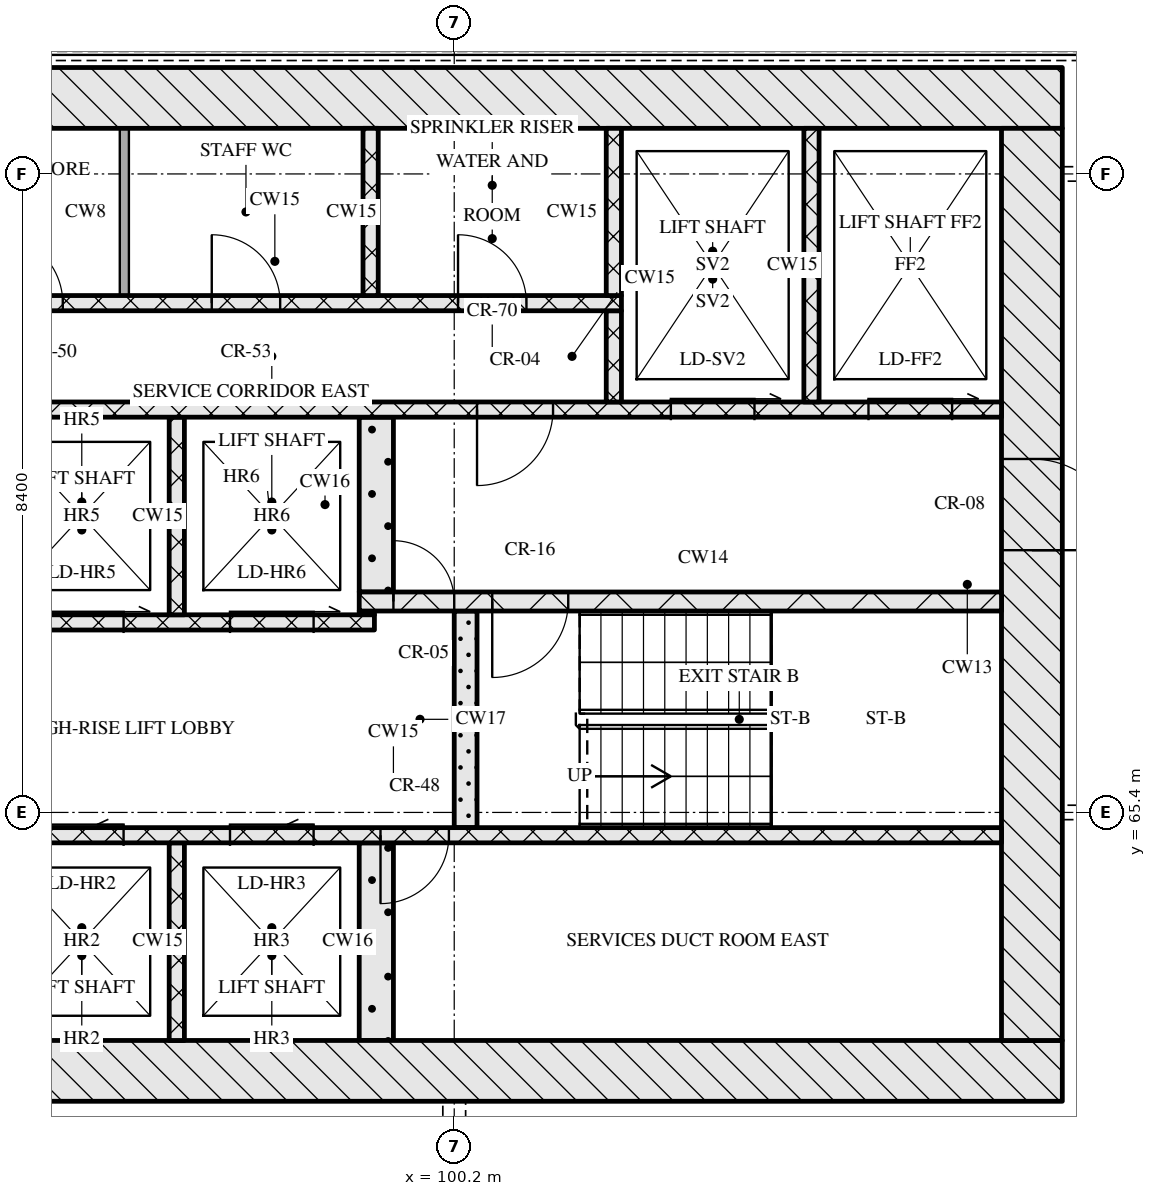
"""IFC4 building model, lengths in metres.
Left out: names, types, materials, properties, quantities, classifications, styles, units other than length and angle.
Written with IfcOpenShell. Run it as: python <this file> out.ifc"""

import sys

from ifc_helpers import new_model, si_unit, direction, frame, frame_2d, origin, place, context, subcontext, project, spatial, rectangle, extrude, element, fill, save


model = new_model("IFC4")
c1 = context("Model", 3, precision=1e-05, world=origin(), true_north=direction((0.0, 1.0)))
c2 = subcontext(c1, "Body", "Model", "MODEL_VIEW")
j1 = project(units=[si_unit("LENGTHUNIT", "METRE"), si_unit("PLANEANGLEUNIT", "RADIAN")], contexts=[c1])
p1 = place(None, origin())
s1 = spatial("IfcSite", under=j1, at=p1, CompositionType="ELEMENT")
p2 = place(p1, origin())
s2 = spatial("IfcBuilding", under=s1, at=p2, CompositionType="ELEMENT")
p3 = place(p2, frame((0.0, 0.0, 151.05)))
s3 = spatial("IfcBuildingStorey", under=s2, at=p3, CompositionType="ELEMENT", Elevation=151.05)
p4 = place(p3, frame((67.0, 62.0, 0.0), z_axis=(0.0, 0.0, 1.0), x_axis=(1.0, 0.0, 0.0)))
e1 = element("IfcWall", 1, at=p4, inside=s3, PredefinedType="SOLIDWALL", context=c2, shape_type="SweptSolid", body=[
    extrude(rectangle(XDim=41.2, YDim=0.8, at=frame_2d((20.6, 0.0))), origin(), (0.0, 0.0, 1.0), 3.32),
])
p5 = place(p4, frame((20.95, 0.0, 0.0)))
e2 = element("IfcOpeningElement", 2, at=p5, cuts=e1, PredefinedType="OPENING", context=c2, shape_type="SweptSolid", body=[
    extrude(rectangle(XDim=1.8, YDim=2.1, at=frame_2d((0.9, 1.05))), frame((0.0, 0.41, 0.0), z_axis=(0.0, -1.0, 0.0), x_axis=(1.0, 0.0, 0.0)), (0.0, 0.0, 1.0), 0.82),
])
p6 = place(p3, frame((67.0, 74.8, 0.0), z_axis=(0.0, 0.0, 1.0), x_axis=(1.0, 0.0, 0.0)))
e3 = element("IfcWall", 3, at=p6, inside=s3, PredefinedType="SOLIDWALL", context=c2, shape_type="SweptSolid", body=[
    extrude(rectangle(XDim=41.2, YDim=0.8, at=frame_2d((20.6, 0.0))), origin(), (0.0, 0.0, 1.0), 3.32),
])
p7 = place(p3, frame((107.8, 62.4, 0.0), z_axis=(0.0, 0.0, 1.0), x_axis=(0.0, 1.0, 0.0)))
e4 = element("IfcWall", 4, at=p7, inside=s3, PredefinedType="SOLIDWALL", context=c2, shape_type="SweptSolid", body=[
    extrude(rectangle(XDim=12.0, YDim=0.8, at=frame_2d((6.0, 0.0))), origin(), (0.0, 0.0, 1.0), 3.32),
])
p8 = place(p7, frame((6.45, 0.0, 0.0)))
e5 = element("IfcOpeningElement", 5, at=p8, cuts=e4, PredefinedType="OPENING", context=c2, shape_type="SweptSolid", body=[
    extrude(rectangle(XDim=1.2, YDim=2.1, at=frame_2d((0.6, 1.05))), frame((0.0, 0.41, 0.0), z_axis=(0.0, -1.0, 0.0), x_axis=(1.0, 0.0, 0.0)), (0.0, 0.0, 1.0), 0.82),
])
p9 = place(p3, frame((96.55, 62.4, 0.0), z_axis=(0.0, 0.0, 1.0), x_axis=(0.0, 1.0, 0.0)))
e6 = element("IfcWall", 6, at=p9, inside=s3, PredefinedType="SOLIDWALL", context=c2, shape_type="SweptSolid", body=[
    extrude(rectangle(XDim=2.6, YDim=0.2, at=frame_2d((1.3, 0.0))), origin(), (0.0, 0.0, 1.0), 3.32),
])
p10 = place(p3, frame((99.175, 62.4, 0.0), z_axis=(0.0, 0.0, 1.0), x_axis=(0.0, 1.0, 0.0)))
e7 = element("IfcWall", 7, at=p10, inside=s3, PredefinedType="SOLIDWALL", context=c2, shape_type="SweptSolid", body=[
    extrude(rectangle(XDim=2.6, YDim=0.45, at=frame_2d((1.3, 0.0))), origin(), (0.0, 0.0, 1.0), 3.32),
])
p11 = place(p3, frame((91.4, 65.1, 0.0), z_axis=(0.0, 0.0, 1.0), x_axis=(1.0, 0.0, 0.0)))
e8 = element("IfcWall", 8, at=p11, inside=s3, PredefinedType="SOLIDWALL", context=c2, shape_type="SweptSolid", body=[
    extrude(rectangle(XDim=16.0, YDim=0.2, at=frame_2d((8.0, 0.0))), origin(), (0.0, 0.0, 1.0), 3.32),
])
p12 = place(p11, frame((0.85, 0.0, 0.0)))
e9 = element("IfcOpeningElement", 9, at=p12, cuts=e8, PredefinedType="OPENING", context=c2, shape_type="SweptSolid", body=[
    extrude(rectangle(XDim=1.1, YDim=2.1, at=frame_2d((0.55, 1.05))), frame((0.0, 0.11, 0.0), z_axis=(0.0, -1.0, 0.0), x_axis=(1.0, 0.0, 0.0)), (0.0, 0.0, 1.0), 0.22),
])
p13 = place(p11, frame((3.35, 0.0, 0.0)))
e10 = element("IfcOpeningElement", 10, at=p13, cuts=e8, PredefinedType="OPENING", context=c2, shape_type="SweptSolid", body=[
    extrude(rectangle(XDim=1.1, YDim=2.1, at=frame_2d((0.55, 1.05))), frame((0.0, 0.11, 0.0), z_axis=(0.0, -1.0, 0.0), x_axis=(1.0, 0.0, 0.0)), (0.0, 0.0, 1.0), 0.22),
])
p14 = place(p11, frame((5.85, 0.0, 0.0)))
e11 = element("IfcOpeningElement", 11, at=p14, cuts=e8, PredefinedType="OPENING", context=c2, shape_type="SweptSolid", body=[
    extrude(rectangle(XDim=1.1, YDim=2.1, at=frame_2d((0.55, 1.05))), frame((0.0, 0.11, 0.0), z_axis=(0.0, -1.0, 0.0), x_axis=(1.0, 0.0, 0.0)), (0.0, 0.0, 1.0), 0.22),
])
p15 = place(p11, frame((7.83, 0.0, 0.0)))
e12 = element("IfcOpeningElement", 12, at=p15, cuts=e8, PredefinedType="OPENING", context=c2, shape_type="SweptSolid", body=[
    extrude(rectangle(XDim=0.9, YDim=2.1, at=frame_2d((0.45, 1.05))), frame((0.0, 0.11, 0.0), z_axis=(0.0, -1.0, 0.0), x_axis=(1.0, 0.0, 0.0)), (0.0, 0.0, 1.0), 0.22),
])
p16 = place(p3, frame((100.35, 65.2, 0.0), z_axis=(0.0, 0.0, 1.0), x_axis=(0.0, 1.0, 0.0)))
e13 = element("IfcWall", 13, at=p16, inside=s3, PredefinedType="SOLIDWALL", context=c2, shape_type="SweptSolid", body=[
    extrude(rectangle(XDim=2.85, YDim=0.3, at=frame_2d((1.425, 0.0))), origin(), (0.0, 0.0, 1.0), 3.32),
])
p17 = place(p3, frame((76.05, 67.9, 0.0), z_axis=(0.0, 0.0, 1.0), x_axis=(1.0, 0.0, 0.0)))
e14 = element("IfcWall", 14, at=p17, inside=s3, PredefinedType="SOLIDWALL", context=c2, shape_type="SweptSolid", body=[
    extrude(rectangle(XDim=23.1, YDim=0.2, at=frame_2d((11.55, 0.0))), origin(), (0.0, 0.0, 1.0), 3.32),
])
p18 = place(p17, frame((1.4, 0.0, 0.0)))
e15 = element("IfcOpeningElement", 15, at=p18, cuts=e14, PredefinedType="OPENING", context=c2, shape_type="SweptSolid", body=[
    extrude(rectangle(XDim=0.9, YDim=2.1, at=frame_2d((0.45, 1.05))), frame((0.0, 0.11, 0.0), z_axis=(0.0, -1.0, 0.0), x_axis=(1.0, 0.0, 0.0)), (0.0, 0.0, 1.0), 0.22),
])
p19 = place(p17, frame((5.11, 0.0, 0.0)))
e16 = element("IfcOpeningElement", 16, at=p19, cuts=e14, PredefinedType="OPENING", context=c2, shape_type="SweptSolid", body=[
    extrude(rectangle(XDim=0.9, YDim=2.1, at=frame_2d((0.45, 1.05))), frame((0.0, 0.11, 0.0), z_axis=(0.0, -1.0, 0.0), x_axis=(1.0, 0.0, 0.0)), (0.0, 0.0, 1.0), 0.22),
])
p20 = place(p17, frame((8.45, 0.0, 0.0)))
e17 = element("IfcOpeningElement", 17, at=p20, cuts=e14, PredefinedType="OPENING", context=c2, shape_type="SweptSolid", body=[
    extrude(rectangle(XDim=0.9, YDim=2.1, at=frame_2d((0.45, 1.05))), frame((0.0, 0.11, 0.0), z_axis=(0.0, -1.0, 0.0), x_axis=(1.0, 0.0, 0.0)), (0.0, 0.0, 1.0), 0.22),
])
p21 = place(p17, frame((10.91, 0.0, 0.0)))
e18 = element("IfcOpeningElement", 18, at=p21, cuts=e14, PredefinedType="OPENING", context=c2, shape_type="SweptSolid", body=[
    extrude(rectangle(XDim=0.9, YDim=2.1, at=frame_2d((0.45, 1.05))), frame((0.0, 0.11, 0.0), z_axis=(0.0, -1.0, 0.0), x_axis=(1.0, 0.0, 0.0)), (0.0, 0.0, 1.0), 0.22),
])
p22 = place(p17, frame((13.55, 0.0, 0.0)))
e19 = element("IfcOpeningElement", 19, at=p22, cuts=e14, PredefinedType="OPENING", context=c2, shape_type="SweptSolid", body=[
    extrude(rectangle(XDim=1.0, YDim=2.1, at=frame_2d((0.5, 1.05))), frame((0.0, 0.11, 0.0), z_axis=(0.0, -1.0, 0.0), x_axis=(1.0, 0.0, 0.0)), (0.0, 0.0, 1.0), 0.22),
])
p23 = place(p17, frame((16.2, 0.0, 0.0)))
e20 = element("IfcOpeningElement", 20, at=p23, cuts=e14, PredefinedType="OPENING", context=c2, shape_type="SweptSolid", body=[
    extrude(rectangle(XDim=1.1, YDim=2.1, at=frame_2d((0.55, 1.05))), frame((0.0, 0.11, 0.0), z_axis=(0.0, -1.0, 0.0), x_axis=(1.0, 0.0, 0.0)), (0.0, 0.0, 1.0), 0.22),
])
p24 = place(p17, frame((18.7, 0.0, 0.0)))
e21 = element("IfcOpeningElement", 21, at=p24, cuts=e14, PredefinedType="OPENING", context=c2, shape_type="SweptSolid", body=[
    extrude(rectangle(XDim=1.1, YDim=2.1, at=frame_2d((0.55, 1.05))), frame((0.0, 0.11, 0.0), z_axis=(0.0, -1.0, 0.0), x_axis=(1.0, 0.0, 0.0)), (0.0, 0.0, 1.0), 0.22),
])
p25 = place(p17, frame((21.2, 0.0, 0.0)))
e22 = element("IfcOpeningElement", 22, at=p25, cuts=e14, PredefinedType="OPENING", context=c2, shape_type="SweptSolid", body=[
    extrude(rectangle(XDim=1.1, YDim=2.1, at=frame_2d((0.55, 1.05))), frame((0.0, 0.11, 0.0), z_axis=(0.0, -1.0, 0.0), x_axis=(1.0, 0.0, 0.0)), (0.0, 0.0, 1.0), 0.22),
])
p26 = place(p3, frame((96.55, 68.0, 0.0), z_axis=(0.0, 0.0, 1.0), x_axis=(0.0, 1.0, 0.0)))
e23 = element("IfcWall", 23, at=p26, inside=s3, PredefinedType="SOLIDWALL", context=c2, shape_type="SweptSolid", body=[
    extrude(rectangle(XDim=2.6, YDim=0.2, at=frame_2d((1.3, 0.0))), origin(), (0.0, 0.0, 1.0), 3.32),
])
p27 = place(p3, frame((98.95, 68.025, 0.0), z_axis=(0.0, 0.0, 1.0), x_axis=(1.0, 0.0, 0.0)))
e24 = element("IfcWall", 24, at=p27, inside=s3, PredefinedType="SOLIDWALL", context=c2, shape_type="SweptSolid", body=[
    extrude(rectangle(XDim=0.2, YDim=0.05, at=frame_2d((0.1, 0.0))), origin(), (0.0, 0.0, 1.0), 3.32),
])
p28 = place(p3, frame((98.95, 68.175, 0.0), z_axis=(0.0, 0.0, 1.0), x_axis=(1.0, 0.0, 0.0)))
e25 = element("IfcWall", 25, at=p28, inside=s3, PredefinedType="SOLIDWALL", context=c2, shape_type="SweptSolid", body=[
    extrude(rectangle(XDim=8.45, YDim=0.25, at=frame_2d((4.225, 0.0))), origin(), (0.0, 0.0, 1.0), 3.32),
])
p29 = place(p28, frame((0.45, 0.0, 0.0)))
e26 = element("IfcOpeningElement", 26, at=p29, cuts=e25, PredefinedType="OPENING", context=c2, shape_type="SweptSolid", body=[
    extrude(rectangle(XDim=0.8, YDim=2.1, at=frame_2d((0.4, 1.05))), frame((0.0, 0.135, 0.0), z_axis=(0.0, -1.0, 0.0), x_axis=(1.0, 0.0, 0.0)), (0.0, 0.0, 1.0), 0.27),
])
p30 = place(p28, frame((1.75, 0.0, 0.0)))
e27 = element("IfcOpeningElement", 27, at=p30, cuts=e25, PredefinedType="OPENING", context=c2, shape_type="SweptSolid", body=[
    extrude(rectangle(XDim=1.0, YDim=2.1, at=frame_2d((0.5, 1.05))), frame((0.0, 0.135, 0.0), z_axis=(0.0, -1.0, 0.0), x_axis=(1.0, 0.0, 0.0)), (0.0, 0.0, 1.0), 0.27),
])
p31 = place(p3, frame((99.175, 68.3, 0.0), z_axis=(0.0, 0.0, 1.0), x_axis=(0.0, 1.0, 0.0)))
e28 = element("IfcWall", 28, at=p31, inside=s3, PredefinedType="SOLIDWALL", context=c2, shape_type="SweptSolid", body=[
    extrude(rectangle(XDim=2.3, YDim=0.45, at=frame_2d((1.15, 0.0))), origin(), (0.0, 0.0, 1.0), 3.32),
])
p32 = place(p3, frame((67.8, 70.7, 0.0), z_axis=(0.0, 0.0, 1.0), x_axis=(1.0, 0.0, 0.0)))
e29 = element("IfcWall", 29, at=p32, inside=s3, PredefinedType="SOLIDWALL", context=c2, shape_type="SweptSolid", body=[
    extrude(rectangle(XDim=39.6, YDim=0.2, at=frame_2d((19.8, 0.0))), origin(), (0.0, 0.0, 1.0), 3.32),
])
p33 = place(p32, frame((0.65, 0.0, 0.0)))
e30 = element("IfcOpeningElement", 30, at=p33, cuts=e29, PredefinedType="OPENING", context=c2, shape_type="SweptSolid", body=[
    extrude(rectangle(XDim=1.1, YDim=2.1, at=frame_2d((0.55, 1.05))), frame((0.0, 0.11, 0.0), z_axis=(0.0, -1.0, 0.0), x_axis=(1.0, 0.0, 0.0)), (0.0, 0.0, 1.0), 0.22),
])
p34 = place(p32, frame((3.25, 0.0, 0.0)))
e31 = element("IfcOpeningElement", 31, at=p34, cuts=e29, PredefinedType="OPENING", context=c2, shape_type="SweptSolid", body=[
    extrude(rectangle(XDim=1.1, YDim=2.1, at=frame_2d((0.55, 1.05))), frame((0.0, 0.11, 0.0), z_axis=(0.0, -1.0, 0.0), x_axis=(1.0, 0.0, 0.0)), (0.0, 0.0, 1.0), 0.22),
])
p35 = place(p32, frame((5.9, 0.0, 0.0)))
e32 = element("IfcOpeningElement", 32, at=p35, cuts=e29, PredefinedType="OPENING", context=c2, shape_type="SweptSolid", body=[
    extrude(rectangle(XDim=1.0, YDim=2.1, at=frame_2d((0.5, 1.05))), frame((0.0, 0.11, 0.0), z_axis=(0.0, -1.0, 0.0), x_axis=(1.0, 0.0, 0.0)), (0.0, 0.0, 1.0), 0.22),
])
p36 = place(p32, frame((21.7, 0.0, 0.0)))
e33 = element("IfcOpeningElement", 33, at=p36, cuts=e29, PredefinedType="OPENING", context=c2, shape_type="SweptSolid", body=[
    extrude(rectangle(XDim=1.0, YDim=2.1, at=frame_2d((0.5, 1.05))), frame((0.0, 0.11, 0.0), z_axis=(0.0, -1.0, 0.0), x_axis=(1.0, 0.0, 0.0)), (0.0, 0.0, 1.0), 0.22),
])
p37 = place(p32, frame((32.7, 0.0, 0.0)))
e34 = element("IfcOpeningElement", 34, at=p37, cuts=e29, PredefinedType="OPENING", context=c2, shape_type="SweptSolid", body=[
    extrude(rectangle(XDim=1.0, YDim=2.1, at=frame_2d((0.5, 1.05))), frame((0.0, 0.11, 0.0), z_axis=(0.0, -1.0, 0.0), x_axis=(1.0, 0.0, 0.0)), (0.0, 0.0, 1.0), 0.22),
])
p38 = place(p32, frame((35.25, 0.0, 0.0)))
e35 = element("IfcOpeningElement", 35, at=p38, cuts=e29, PredefinedType="OPENING", context=c2, shape_type="SweptSolid", body=[
    extrude(rectangle(XDim=1.1, YDim=2.1, at=frame_2d((0.55, 1.05))), frame((0.0, 0.11, 0.0), z_axis=(0.0, -1.0, 0.0), x_axis=(1.0, 0.0, 0.0)), (0.0, 0.0, 1.0), 0.22),
])
p39 = place(p32, frame((37.85, 0.0, 0.0)))
e36 = element("IfcOpeningElement", 36, at=p39, cuts=e29, PredefinedType="OPENING", context=c2, shape_type="SweptSolid", body=[
    extrude(rectangle(XDim=1.1, YDim=2.1, at=frame_2d((0.55, 1.05))), frame((0.0, 0.11, 0.0), z_axis=(0.0, -1.0, 0.0), x_axis=(1.0, 0.0, 0.0)), (0.0, 0.0, 1.0), 0.22),
])
p40 = place(p3, frame((102.3, 70.8, 0.0), z_axis=(0.0, 0.0, 1.0), x_axis=(0.0, 1.0, 0.0)))
e37 = element("IfcWall", 37, at=p40, inside=s3, PredefinedType="SOLIDWALL", context=c2, shape_type="SweptSolid", body=[
    extrude(rectangle(XDim=1.2, YDim=0.2, at=frame_2d((0.6, 0.0))), origin(), (0.0, 0.0, 1.0), 3.32),
])
p41 = place(p3, frame((104.9, 70.8, 0.0), z_axis=(0.0, 0.0, 1.0), x_axis=(0.0, 1.0, 0.0)))
e38 = element("IfcWall", 38, at=p41, inside=s3, PredefinedType="SOLIDWALL", context=c2, shape_type="SweptSolid", body=[
    extrude(rectangle(XDim=3.6, YDim=0.2, at=frame_2d((1.8, 0.0))), origin(), (0.0, 0.0, 1.0), 3.32),
])
p42 = place(p3, frame((93.28, 72.1, 0.0), z_axis=(0.0, 0.0, 1.0), x_axis=(1.0, 0.0, 0.0)))
e39 = element("IfcWall", 39, at=p42, inside=s3, PredefinedType="SOLIDWALL", context=c2, shape_type="SweptSolid", body=[
    extrude(rectangle(XDim=9.12, YDim=0.2, at=frame_2d((4.56, 0.0))), origin(), (0.0, 0.0, 1.0), 3.32),
])
p43 = place(p42, frame((0.87, 0.0, 0.0)))
e40 = element("IfcOpeningElement", 40, at=p43, cuts=e39, PredefinedType="OPENING", context=c2, shape_type="SweptSolid", body=[
    extrude(rectangle(XDim=0.9, YDim=2.1, at=frame_2d((0.45, 1.05))), frame((0.0, 0.11, 0.0), z_axis=(0.0, -1.0, 0.0), x_axis=(1.0, 0.0, 0.0)), (0.0, 0.0, 1.0), 0.22),
])
p44 = place(p42, frame((3.73, 0.0, 0.0)))
e41 = element("IfcOpeningElement", 41, at=p44, cuts=e39, PredefinedType="OPENING", context=c2, shape_type="SweptSolid", body=[
    extrude(rectangle(XDim=0.9, YDim=2.1, at=frame_2d((0.45, 1.05))), frame((0.0, 0.11, 0.0), z_axis=(0.0, -1.0, 0.0), x_axis=(1.0, 0.0, 0.0)), (0.0, 0.0, 1.0), 0.22),
])
p45 = place(p42, frame((6.97, 0.0, 0.0)))
e42 = element("IfcOpeningElement", 42, at=p45, cuts=e39, PredefinedType="OPENING", context=c2, shape_type="SweptSolid", body=[
    extrude(rectangle(XDim=0.9, YDim=2.1, at=frame_2d((0.45, 1.05))), frame((0.0, 0.11, 0.0), z_axis=(0.0, -1.0, 0.0), x_axis=(1.0, 0.0, 0.0)), (0.0, 0.0, 1.0), 0.22),
])
p46 = place(p3, frame((95.86, 72.2, 0.0), z_axis=(0.0, 0.0, 1.0), x_axis=(0.0, 1.0, 0.0)))
e43 = element("IfcWall", 43, at=p46, inside=s3, PredefinedType="PARTITIONING", context=c2, shape_type="SweptSolid", body=[
    extrude(rectangle(XDim=2.2, YDim=0.12, at=frame_2d((1.1, 0.0))), origin(), (0.0, 0.0, 1.0), 3.32),
])
for number, where, z_axis, x_axis in (
    (44, (99.1, 72.2, 0.0), (0.0, 0.0, 1.0), (0.0, 1.0, 0.0)),
    (45, (102.3, 72.2, 0.0), (0.0, 0.0, 1.0), (0.0, 1.0, 0.0)),
):
    element("IfcWall", number, at=place(p3, frame(where, z_axis=z_axis, x_axis=x_axis)), inside=s3, PredefinedType="SOLIDWALL", context=c2, shape_type="SweptSolid", body=[
        extrude(rectangle(XDim=2.2, YDim=0.2, at=frame_2d((1.1, 0.0))), origin(), (0.0, 0.0, 1.0), 3.32),
    ])
p47 = place(p13, origin())
e46 = element("IfcDoor", 46, at=p47, inside=s3, OperationType="SLIDING_TO_LEFT", PredefinedType="DOOR", context=c2, shape_type="SweptSolid", body=[
    extrude(rectangle(XDim=1.1, YDim=2.1, at=frame_2d((0.55, 1.05))), frame((0.0, 0.025, 0.0), z_axis=(0.0, -1.0, 0.0), x_axis=(1.0, 0.0, 0.0)), (0.0, 0.0, 1.0), 0.05),
])
fill(e10, e46)
p48 = place(p14, origin())
e47 = element("IfcDoor", 47, at=p48, inside=s3, OperationType="SLIDING_TO_LEFT", PredefinedType="DOOR", context=c2, shape_type="SweptSolid", body=[
    extrude(rectangle(XDim=1.1, YDim=2.1, at=frame_2d((0.55, 1.05))), frame((0.0, 0.025, 0.0), z_axis=(0.0, -1.0, 0.0), x_axis=(1.0, 0.0, 0.0)), (0.0, 0.0, 1.0), 0.05),
])
fill(e11, e47)
p49 = place(p15, origin())
e48 = element("IfcDoor", 48, at=p49, inside=s3, OperationType="SINGLE_SWING_RIGHT", PredefinedType="DOOR", context=c2, shape_type="SweptSolid", body=[
    extrude(rectangle(XDim=0.9, YDim=2.1, at=frame_2d((0.45, 1.05))), frame((0.0, 0.025, 0.0), z_axis=(0.0, -1.0, 0.0), x_axis=(1.0, 0.0, 0.0)), (0.0, 0.0, 1.0), 0.05),
])
fill(e12, e48)
p50 = place(p24, origin())
e49 = element("IfcDoor", 49, at=p50, inside=s3, OperationType="SLIDING_TO_RIGHT", PredefinedType="DOOR", context=c2, shape_type="SweptSolid", body=[
    extrude(rectangle(XDim=1.1, YDim=2.1, at=frame_2d((0.55, 1.05))), frame((0.0, 0.025, 0.0), z_axis=(0.0, -1.0, 0.0), x_axis=(1.0, 0.0, 0.0)), (0.0, 0.0, 1.0), 0.05),
])
fill(e21, e49)
p51 = place(p25, origin())
e50 = element("IfcDoor", 50, at=p51, inside=s3, OperationType="SLIDING_TO_RIGHT", PredefinedType="DOOR", context=c2, shape_type="SweptSolid", body=[
    extrude(rectangle(XDim=1.1, YDim=2.1, at=frame_2d((0.55, 1.05))), frame((0.0, 0.025, 0.0), z_axis=(0.0, -1.0, 0.0), x_axis=(1.0, 0.0, 0.0)), (0.0, 0.0, 1.0), 0.05),
])
fill(e22, e50)
p52 = place(p29, origin())
e51 = element("IfcDoor", 51, at=p52, inside=s3, OperationType="SINGLE_SWING_LEFT", PredefinedType="DOOR", context=c2, shape_type="SweptSolid", body=[
    extrude(rectangle(XDim=0.8, YDim=2.1, at=frame_2d((0.4, 1.05))), frame((0.0, 0.025, 0.0), z_axis=(0.0, -1.0, 0.0), x_axis=(1.0, 0.0, 0.0)), (0.0, 0.0, 1.0), 0.05),
])
fill(e26, e51)
p53 = place(p30, origin())
e52 = element("IfcDoor", 52, at=p53, inside=s3, OperationType="SINGLE_SWING_RIGHT", PredefinedType="DOOR", context=c2, shape_type="SweptSolid", body=[
    extrude(rectangle(XDim=1.0, YDim=2.1, at=frame_2d((0.5, 1.05))), frame((0.0, 0.025, 0.0), z_axis=(0.0, -1.0, 0.0), x_axis=(1.0, 0.0, 0.0)), (0.0, 0.0, 1.0), 0.05),
])
fill(e27, e52)
p54 = place(p8, origin())
e53 = element("IfcDoor", 53, at=p54, inside=s3, OperationType="SINGLE_SWING_RIGHT", PredefinedType="DOOR", context=c2, shape_type="SweptSolid", body=[
    extrude(rectangle(XDim=1.2, YDim=2.1, at=frame_2d((0.6, 1.05))), frame((0.0, 0.025, 0.0), z_axis=(0.0, -1.0, 0.0), x_axis=(1.0, 0.0, 0.0)), (0.0, 0.0, 1.0), 0.05),
])
fill(e5, e53)
p55 = place(p37, origin())
e54 = element("IfcDoor", 54, at=p55, inside=s3, OperationType="SINGLE_SWING_RIGHT", PredefinedType="DOOR", context=c2, shape_type="SweptSolid", body=[
    extrude(rectangle(XDim=1.0, YDim=2.1, at=frame_2d((0.5, 1.05))), frame((0.0, 0.025, 0.0), z_axis=(0.0, -1.0, 0.0), x_axis=(1.0, 0.0, 0.0)), (0.0, 0.0, 1.0), 0.05),
])
fill(e34, e54)
p56 = place(p38, origin())
e55 = element("IfcDoor", 55, at=p56, inside=s3, OperationType="SLIDING_TO_RIGHT", PredefinedType="DOOR", context=c2, shape_type="SweptSolid", body=[
    extrude(rectangle(XDim=1.1, YDim=2.1, at=frame_2d((0.55, 1.05))), frame((0.0, 0.025, 0.0), z_axis=(0.0, -1.0, 0.0), x_axis=(1.0, 0.0, 0.0)), (0.0, 0.0, 1.0), 0.05),
])
fill(e35, e55)
p57 = place(p39, origin())
e56 = element("IfcDoor", 56, at=p57, inside=s3, OperationType="SLIDING_TO_RIGHT", PredefinedType="DOOR", context=c2, shape_type="SweptSolid", body=[
    extrude(rectangle(XDim=1.1, YDim=2.1, at=frame_2d((0.55, 1.05))), frame((0.0, 0.025, 0.0), z_axis=(0.0, -1.0, 0.0), x_axis=(1.0, 0.0, 0.0)), (0.0, 0.0, 1.0), 0.05),
])
fill(e36, e56)
p58 = place(p43, origin())
e57 = element("IfcDoor", 57, at=p58, inside=s3, OperationType="SINGLE_SWING_LEFT", PredefinedType="DOOR", context=c2, shape_type="SweptSolid", body=[
    extrude(rectangle(XDim=0.9, YDim=2.1, at=frame_2d((0.45, 1.05))), frame((0.0, 0.025, 0.0), z_axis=(0.0, -1.0, 0.0), x_axis=(1.0, 0.0, 0.0)), (0.0, 0.0, 1.0), 0.05),
])
fill(e40, e57)
p59 = place(p44, origin())
e58 = element("IfcDoor", 58, at=p59, inside=s3, OperationType="SINGLE_SWING_LEFT", PredefinedType="DOOR", context=c2, shape_type="SweptSolid", body=[
    extrude(rectangle(XDim=0.9, YDim=2.1, at=frame_2d((0.45, 1.05))), frame((0.0, 0.025, 0.0), z_axis=(0.0, -1.0, 0.0), x_axis=(1.0, 0.0, 0.0)), (0.0, 0.0, 1.0), 0.05),
])
fill(e41, e58)
p60 = place(p45, origin())
e59 = element("IfcDoor", 59, at=p60, inside=s3, OperationType="SINGLE_SWING_LEFT", PredefinedType="DOOR", context=c2, shape_type="SweptSolid", body=[
    extrude(rectangle(XDim=0.9, YDim=2.1, at=frame_2d((0.45, 1.05))), frame((0.0, 0.025, 0.0), z_axis=(0.0, -1.0, 0.0), x_axis=(1.0, 0.0, 0.0)), (0.0, 0.0, 1.0), 0.05),
])
fill(e42, e59)
save(model, sys.argv[1])
